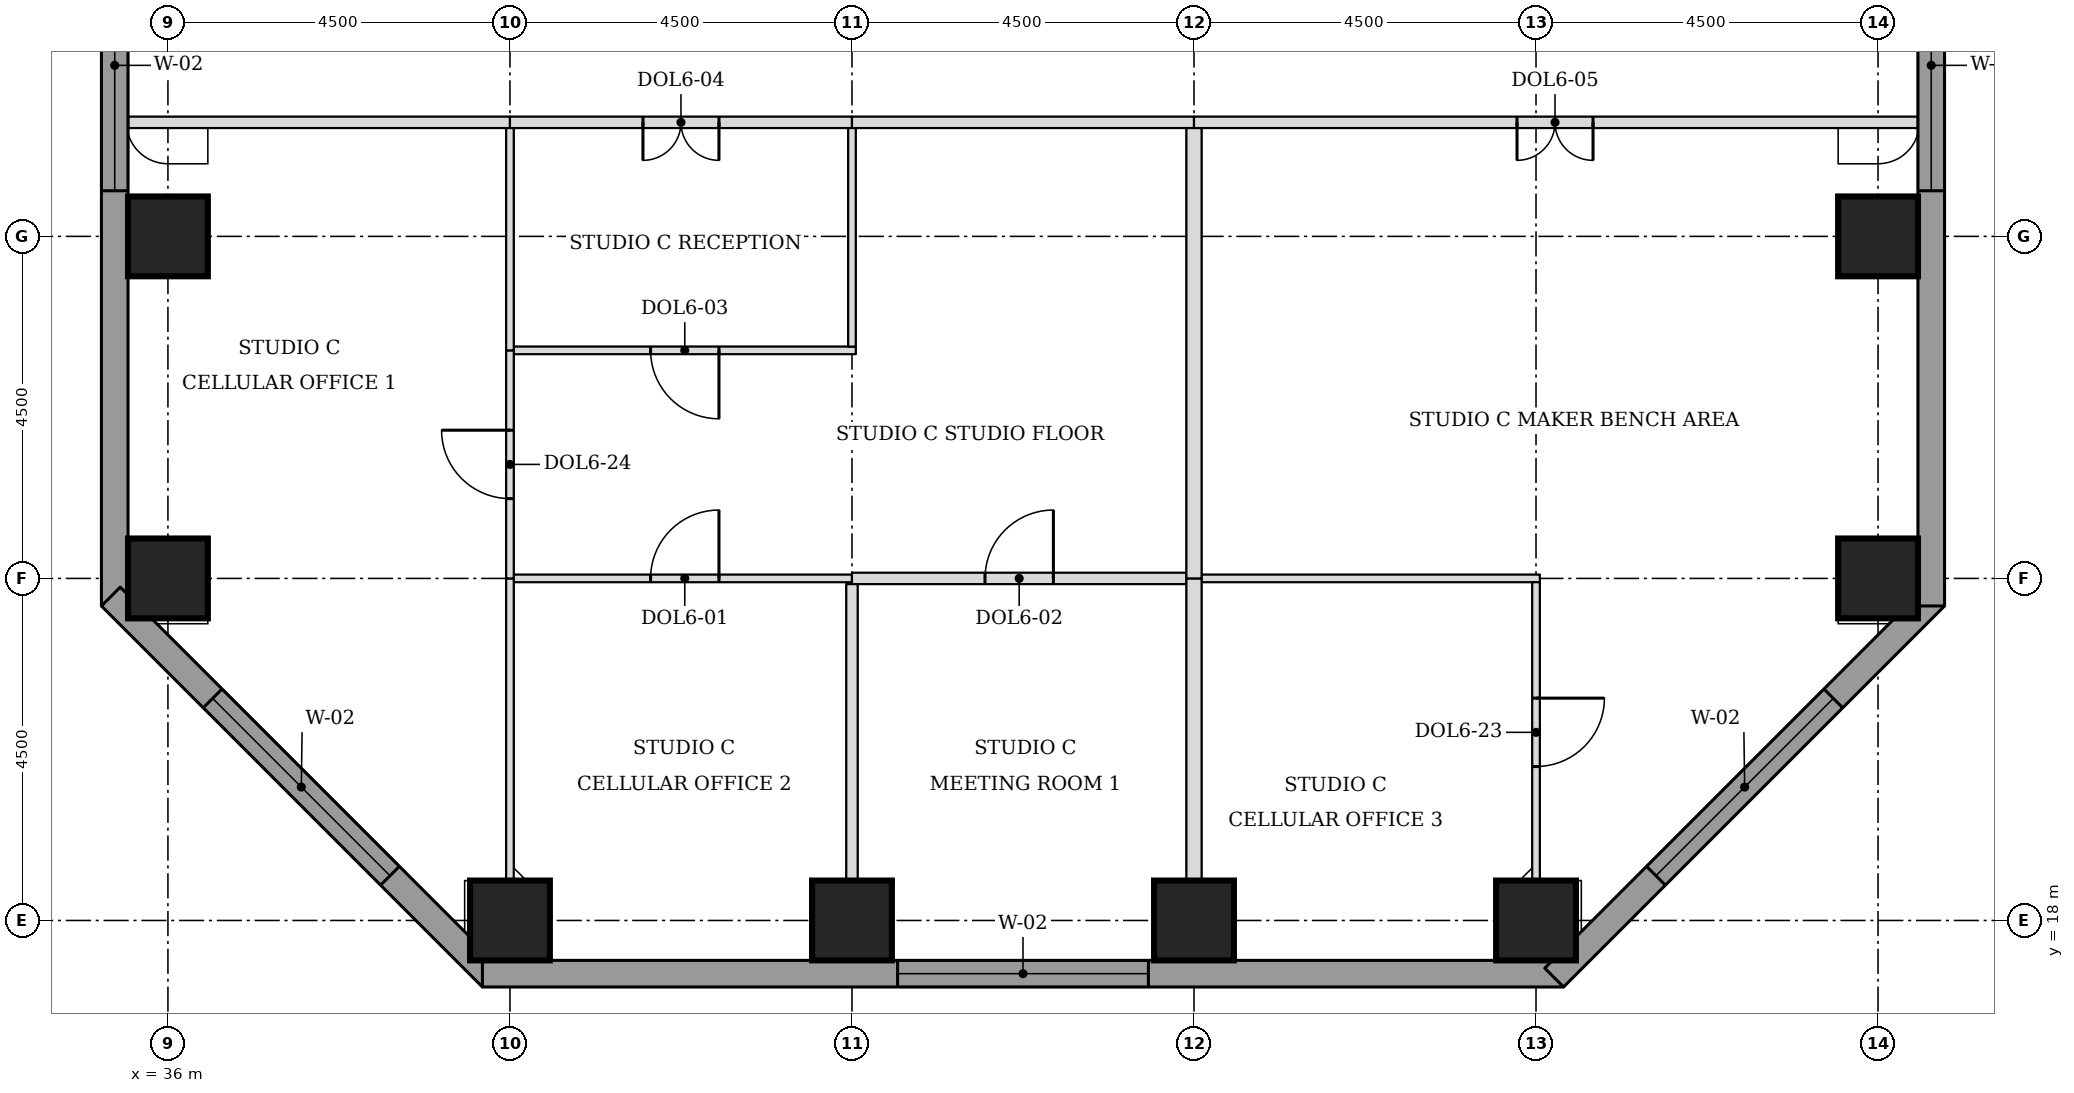
"""IFC4 building model, lengths in metres.
Left out: names, types, materials, properties, quantities, classifications, styles, units other than length and angle.
Written with IfcOpenShell. Run it as: python <this file> out.ifc"""

import sys

from ifc_helpers import new_model, si_unit, direction, frame, frame_2d, origin, origin_2d, place, context, subcontext, project, spatial, rectangle, extrude, element, fill, save


model = new_model("IFC4")
c1 = context("Model", 3, precision=1e-05, world=origin(), true_north=direction((0.0, 1.0)))
c2 = subcontext(c1, "Body", "Model", "MODEL_VIEW")
j1 = project(units=[si_unit("LENGTHUNIT", "METRE"), si_unit("PLANEANGLEUNIT", "RADIAN")], contexts=[c1])
p1 = place(None, origin())
s1 = spatial("IfcSite", under=j1, at=p1, CompositionType="ELEMENT")
p2 = place(p1, origin())
s2 = spatial("IfcBuilding", under=s1, at=p2, CompositionType="ELEMENT")
p3 = place(p2, frame((0.0, 0.0, 115.9)))
s3 = spatial("IfcBuildingStorey", under=s2, at=p3, CompositionType="ELEMENT", Elevation=115.9)
for number, where, z_axis, x_axis in (
    (1, (40.5, 18.0, 0.0), (0.0, 0.0, 1.0), (1.0, 0.0, 0.0)),
    (2, (45.0, 18.0, 0.0), (0.0, 0.0, 1.0), (1.0, 0.0, 0.0)),
    (3, (49.5, 18.0, 0.0), (0.0, 0.0, 1.0), (1.0, 0.0, 0.0)),
    (4, (54.0, 18.0, 0.0), (0.0, 0.0, 1.0), (1.0, 0.0, 0.0)),
    (5, (36.0, 22.5, 0.0), (0.0, 0.0, 1.0), (1.0, 0.0, 0.0)),
    (6, (58.5, 22.5, 0.0), (0.0, 0.0, 1.0), (1.0, 0.0, 0.0)),
    (7, (36.0, 27.0, 0.0), (0.0, 0.0, 1.0), (1.0, 0.0, 0.0)),
    (8, (58.5, 27.0, 0.0), (0.0, 0.0, 1.0), (1.0, 0.0, 0.0)),
):
    element("IfcColumn", number, at=place(p3, frame(where, z_axis=z_axis, x_axis=x_axis)), inside=s3, PredefinedType="COLUMN", context=c2, shape_type="SweptSolid", body=[
        extrude(rectangle(XDim=1.05, YDim=1.05, at=origin_2d()), origin(), (0.0, 0.0, 1.0), 3.7),
    ])
p4 = place(p3, frame((35.3, 39.975, 0.0), z_axis=(0.0, 0.0, 1.0), x_axis=(0.0, -1.0, 0.0)))
e9 = element("IfcWall", 9, at=p4, inside=s3, PredefinedType="STANDARD", context=c2, shape_type="SweptSolid", body=[
    extrude(rectangle(XDim=17.837, YDim=0.35, at=frame_2d((8.919, 0.0))), origin(), (0.0, 0.0, 1.0), 3.525),
])
p5 = place(p4, frame((0.5, 0.0, 0.9)))
e10 = element("IfcOpeningElement", 10, at=p5, cuts=e9, PredefinedType="OPENING", context=c2, shape_type="SweptSolid", body=[
    extrude(rectangle(XDim=3.3, YDim=1.9, at=frame_2d((1.65, 0.95))), frame((0.0, 0.185, 0.0), z_axis=(0.0, -1.0, 0.0), x_axis=(1.0, 0.0, 0.0)), (0.0, 0.0, 1.0), 0.37),
])
p6 = place(p4, frame((9.075, 0.0, 0.9)))
e11 = element("IfcOpeningElement", 11, at=p6, cuts=e9, PredefinedType="OPENING", context=c2, shape_type="SweptSolid", body=[
    extrude(rectangle(XDim=3.3, YDim=1.9, at=frame_2d((1.65, 0.95))), frame((0.0, 0.185, 0.0), z_axis=(0.0, -1.0, 0.0), x_axis=(1.0, 0.0, 0.0)), (0.0, 0.0, 1.0), 0.37),
])
p7 = place(p3, frame((35.249, 22.261, 0.0), z_axis=(0.0, 0.0, 1.0), x_axis=(0.707106781187, -0.707106781187, 0.0)))
e12 = element("IfcWall", 12, at=p7, inside=s3, PredefinedType="STANDARD", context=c2, shape_type="SweptSolid", body=[
    extrude(rectangle(XDim=7.089, YDim=0.35, at=frame_2d((3.544, 0.0))), origin(), (0.0, 0.0, 1.0), 3.525),
])
p8 = place(p7, frame((1.894, 0.0, 0.9)))
e13 = element("IfcOpeningElement", 13, at=p8, cuts=e12, PredefinedType="OPENING", context=c2, shape_type="SweptSolid", body=[
    extrude(rectangle(XDim=3.3, YDim=1.9, at=frame_2d((1.65, 0.95))), frame((0.0, 0.185, 0.0), z_axis=(0.0, -1.0, 0.0), x_axis=(1.0, 0.0, 0.0)), (0.0, 0.0, 1.0), 0.37),
])
p9 = place(p3, frame((40.138, 17.3, 0.0), z_axis=(0.0, 0.0, 1.0), x_axis=(1.0, 0.0, 0.0)))
e14 = element("IfcWall", 14, at=p9, inside=s3, PredefinedType="STANDARD", context=c2, shape_type="SweptSolid", body=[
    extrude(rectangle(XDim=14.225, YDim=0.35, at=frame_2d((7.112, 0.0))), origin(), (0.0, 0.0, 1.0), 3.525),
])
p10 = place(p9, frame((5.462, 0.0, 0.9)))
e15 = element("IfcOpeningElement", 15, at=p10, cuts=e14, PredefinedType="OPENING", context=c2, shape_type="SweptSolid", body=[
    extrude(rectangle(XDim=3.3, YDim=1.9, at=frame_2d((1.65, 0.95))), frame((0.0, 0.185, 0.0), z_axis=(0.0, -1.0, 0.0), x_axis=(1.0, 0.0, 0.0)), (0.0, 0.0, 1.0), 0.37),
])
p11 = place(p3, frame((54.239, 17.249, 0.0), z_axis=(0.0, 0.0, 1.0), x_axis=(0.707106781187, 0.707106781187, 0.0)))
e16 = element("IfcWall", 16, at=p11, inside=s3, PredefinedType="STANDARD", context=c2, shape_type="SweptSolid", body=[
    extrude(rectangle(XDim=7.089, YDim=0.35, at=frame_2d((3.544, 0.0))), origin(), (0.0, 0.0, 1.0), 3.525),
])
p12 = place(p11, frame((1.894, 0.0, 0.9)))
e17 = element("IfcOpeningElement", 17, at=p12, cuts=e16, PredefinedType="OPENING", context=c2, shape_type="SweptSolid", body=[
    extrude(rectangle(XDim=3.3, YDim=1.9, at=frame_2d((1.65, 0.95))), frame((0.0, 0.185, 0.0), z_axis=(0.0, -1.0, 0.0), x_axis=(1.0, 0.0, 0.0)), (0.0, 0.0, 1.0), 0.37),
])
p13 = place(p3, frame((59.2, 22.138, 0.0), z_axis=(0.0, 0.0, 1.0), x_axis=(0.0, 1.0, 0.0)))
e18 = element("IfcWall", 18, at=p13, inside=s3, PredefinedType="STANDARD", context=c2, shape_type="SweptSolid", body=[
    extrude(rectangle(XDim=17.837, YDim=0.35, at=frame_2d((8.919, 0.0))), origin(), (0.0, 0.0, 1.0), 3.525),
])
p14 = place(p13, frame((5.462, 0.0, 0.9)))
e19 = element("IfcOpeningElement", 19, at=p14, cuts=e18, PredefinedType="OPENING", context=c2, shape_type="SweptSolid", body=[
    extrude(rectangle(XDim=3.3, YDim=1.9, at=frame_2d((1.65, 0.95))), frame((0.0, 0.185, 0.0), z_axis=(0.0, -1.0, 0.0), x_axis=(1.0, 0.0, 0.0)), (0.0, 0.0, 1.0), 0.37),
])
p15 = place(p13, frame((14.037, 0.0, 0.9)))
e20 = element("IfcOpeningElement", 20, at=p15, cuts=e18, PredefinedType="OPENING", context=c2, shape_type="SweptSolid", body=[
    extrude(rectangle(XDim=3.3, YDim=1.9, at=frame_2d((1.65, 0.95))), frame((0.0, 0.185, 0.0), z_axis=(0.0, -1.0, 0.0), x_axis=(1.0, 0.0, 0.0)), (0.0, 0.0, 1.0), 0.37),
])
p16 = place(p3, frame((40.55, 22.5, 0.0), z_axis=(0.0, 0.0, 1.0), x_axis=(1.0, 0.0, 0.0)))
e21 = element("IfcWall", 21, at=p16, inside=s3, PredefinedType="PARTITIONING", context=c2, shape_type="SweptSolid", body=[
    extrude(rectangle(XDim=4.45, YDim=0.1, at=frame_2d((2.225, 0.0))), origin(), (0.0, 0.0, 1.0), 2.55),
])
p17 = place(p16, frame((1.8, 0.0, 0.0)))
e22 = element("IfcOpeningElement", 22, at=p17, cuts=e21, PredefinedType="OPENING", context=c2, shape_type="SweptSolid", body=[
    extrude(rectangle(XDim=0.9, YDim=2.1, at=frame_2d((0.45, 1.05))), frame((0.0, 0.06, 0.0), z_axis=(0.0, -1.0, 0.0), x_axis=(1.0, 0.0, 0.0)), (0.0, 0.0, 1.0), 0.12),
])
p18 = place(p3, frame((45.0, 22.5, 0.0), z_axis=(0.0, 0.0, 1.0), x_axis=(1.0, 0.0, 0.0)))
e23 = element("IfcWall", 23, at=p18, inside=s3, PredefinedType="PARTITIONING", context=c2, shape_type="SweptSolid", body=[
    extrude(rectangle(XDim=4.4, YDim=0.15, at=frame_2d((2.2, 0.0))), origin(), (0.0, 0.0, 1.0), 2.55),
])
p19 = place(p18, frame((1.75, 0.0, 0.0)))
e24 = element("IfcOpeningElement", 24, at=p19, cuts=e23, PredefinedType="OPENING", context=c2, shape_type="SweptSolid", body=[
    extrude(rectangle(XDim=0.9, YDim=2.1, at=frame_2d((0.45, 1.05))), frame((0.0, 0.085, 0.0), z_axis=(0.0, -1.0, 0.0), x_axis=(1.0, 0.0, 0.0)), (0.0, 0.0, 1.0), 0.17),
])
p20 = place(p3, frame((49.6, 22.5, 0.0), z_axis=(0.0, 0.0, 1.0), x_axis=(1.0, 0.0, 0.0)))
e25 = element("IfcWall", 25, at=p20, inside=s3, PredefinedType="PARTITIONING", context=c2, shape_type="SweptSolid", body=[
    extrude(rectangle(XDim=4.45, YDim=0.1, at=frame_2d((2.225, 0.0))), origin(), (0.0, 0.0, 1.0), 2.55),
])
p21 = place(p3, frame((40.55, 25.5, 0.0), z_axis=(0.0, 0.0, 1.0), x_axis=(1.0, 0.0, 0.0)))
e26 = element("IfcWall", 26, at=p21, inside=s3, PredefinedType="PARTITIONING", context=c2, shape_type="SweptSolid", body=[
    extrude(rectangle(XDim=4.5, YDim=0.1, at=frame_2d((2.25, 0.0))), origin(), (0.0, 0.0, 1.0), 3.55),
])
p22 = place(p21, frame((1.8, 0.0, 0.0)))
e27 = element("IfcOpeningElement", 27, at=p22, cuts=e26, PredefinedType="OPENING", context=c2, shape_type="SweptSolid", body=[
    extrude(rectangle(XDim=0.9, YDim=2.1, at=frame_2d((0.45, 1.05))), frame((0.0, 0.06, 0.0), z_axis=(0.0, -1.0, 0.0), x_axis=(1.0, 0.0, 0.0)), (0.0, 0.0, 1.0), 0.12),
])
p23 = place(p3, frame((35.475, 28.5, 0.0), z_axis=(0.0, 0.0, 1.0), x_axis=(1.0, 0.0, 0.0)))
e28 = element("IfcWall", 28, at=p23, inside=s3, PredefinedType="PARTITIONING", context=c2, shape_type="SweptSolid", body=[
    extrude(rectangle(XDim=5.025, YDim=0.15, at=frame_2d((2.512, 0.0))), origin(), (0.0, 0.0, 1.0), 3.55),
])
p24 = place(p3, frame((40.5, 28.5, 0.0), z_axis=(0.0, 0.0, 1.0), x_axis=(1.0, 0.0, 0.0)))
e29 = element("IfcWall", 29, at=p24, inside=s3, PredefinedType="PARTITIONING", context=c2, shape_type="SweptSolid", body=[
    extrude(rectangle(XDim=4.5, YDim=0.15, at=frame_2d((2.25, 0.0))), origin(), (0.0, 0.0, 1.0), 3.55),
])
p25 = place(p24, frame((1.75, 0.0, 0.0)))
e30 = element("IfcOpeningElement", 30, at=p25, cuts=e29, PredefinedType="OPENING", context=c2, shape_type="SweptSolid", body=[
    extrude(rectangle(XDim=1.0, YDim=2.1, at=frame_2d((0.5, 1.05))), frame((0.0, 0.085, 0.0), z_axis=(0.0, -1.0, 0.0), x_axis=(1.0, 0.0, 0.0)), (0.0, 0.0, 1.0), 0.17),
])
p26 = place(p3, frame((45.0, 28.5, 0.0), z_axis=(0.0, 0.0, 1.0), x_axis=(1.0, 0.0, 0.0)))
e31 = element("IfcWall", 31, at=p26, inside=s3, PredefinedType="PARTITIONING", context=c2, shape_type="SweptSolid", body=[
    extrude(rectangle(XDim=4.5, YDim=0.15, at=frame_2d((2.25, 0.0))), origin(), (0.0, 0.0, 1.0), 3.55),
])
p27 = place(p3, frame((49.5, 28.5, 0.0), z_axis=(0.0, 0.0, 1.0), x_axis=(1.0, 0.0, 0.0)))
e32 = element("IfcWall", 32, at=p27, inside=s3, PredefinedType="PARTITIONING", context=c2, shape_type="SweptSolid", body=[
    extrude(rectangle(XDim=9.525, YDim=0.15, at=frame_2d((4.762, 0.0))), origin(), (0.0, 0.0, 1.0), 3.55),
])
p28 = place(p27, frame((4.25, 0.0, 0.0)))
e33 = element("IfcOpeningElement", 33, at=p28, cuts=e32, PredefinedType="OPENING", context=c2, shape_type="SweptSolid", body=[
    extrude(rectangle(XDim=1.0, YDim=2.1, at=frame_2d((0.5, 1.05))), frame((0.0, 0.085, 0.0), z_axis=(0.0, -1.0, 0.0), x_axis=(1.0, 0.0, 0.0)), (0.0, 0.0, 1.0), 0.17),
])
p29 = place(p3, frame((45.0, 17.475, 0.0), z_axis=(0.0, 0.0, 1.0), x_axis=(0.0, 1.0, 0.0)))
e34 = element("IfcWall", 34, at=p29, inside=s3, PredefinedType="PARTITIONING", context=c2, shape_type="SweptSolid", body=[
    extrude(rectangle(XDim=4.95, YDim=0.15, at=frame_2d((2.475, 0.0))), origin(), (0.0, 0.0, 1.0), 3.55),
])
p30 = place(p3, frame((49.5, 17.475, 0.0), z_axis=(0.0, 0.0, 1.0), x_axis=(0.0, 1.0, 0.0)))
e35 = element("IfcWall", 35, at=p30, inside=s3, PredefinedType="PARTITIONING", context=c2, shape_type="SweptSolid", body=[
    extrude(rectangle(XDim=5.025, YDim=0.2, at=frame_2d((2.512, 0.0))), origin(), (0.0, 0.0, 1.0), 3.55),
])
p31 = place(p3, frame((40.5, 18.525, 0.0), z_axis=(0.0, 0.0, 1.0), x_axis=(0.0, 1.0, 0.0)))
e36 = element("IfcWall", 36, at=p31, inside=s3, PredefinedType="PARTITIONING", context=c2, shape_type="SweptSolid", body=[
    extrude(rectangle(XDim=3.975, YDim=0.1, at=frame_2d((1.988, 0.0))), origin(), (0.0, 0.0, 1.0), 3.55),
])
p32 = place(p3, frame((54.0, 18.525, 0.0), z_axis=(0.0, 0.0, 1.0), x_axis=(0.0, 1.0, 0.0)))
e37 = element("IfcWall", 37, at=p32, inside=s3, PredefinedType="PARTITIONING", context=c2, shape_type="SweptSolid", body=[
    extrude(rectangle(XDim=3.925, YDim=0.1, at=frame_2d((1.962, 0.0))), origin(), (0.0, 0.0, 1.0), 3.55),
])
p33 = place(p32, frame((1.5, 0.0, 0.0)))
e38 = element("IfcOpeningElement", 38, at=p33, cuts=e37, PredefinedType="OPENING", context=c2, shape_type="SweptSolid", body=[
    extrude(rectangle(XDim=0.9, YDim=2.1, at=frame_2d((0.45, 1.05))), frame((0.0, 0.06, 0.0), z_axis=(0.0, -1.0, 0.0), x_axis=(1.0, 0.0, 0.0)), (0.0, 0.0, 1.0), 0.12),
])
p34 = place(p3, frame((40.5, 22.5, 0.0), z_axis=(0.0, 0.0, 1.0), x_axis=(0.0, 1.0, 0.0)))
e39 = element("IfcWall", 39, at=p34, inside=s3, PredefinedType="PARTITIONING", context=c2, shape_type="SweptSolid", body=[
    extrude(rectangle(XDim=3.0, YDim=0.1, at=frame_2d((1.5, 0.0))), origin(), (0.0, 0.0, 1.0), 3.55),
])
p35 = place(p34, frame((1.05, 0.0, 0.0)))
e40 = element("IfcOpeningElement", 40, at=p35, cuts=e39, PredefinedType="OPENING", context=c2, shape_type="SweptSolid", body=[
    extrude(rectangle(XDim=0.9, YDim=2.1, at=frame_2d((0.45, 1.05))), frame((0.0, 0.06, 0.0), z_axis=(0.0, -1.0, 0.0), x_axis=(1.0, 0.0, 0.0)), (0.0, 0.0, 1.0), 0.12),
])
p36 = place(p3, frame((49.5, 22.5, 0.0), z_axis=(0.0, 0.0, 1.0), x_axis=(0.0, 1.0, 0.0)))
e41 = element("IfcWall", 41, at=p36, inside=s3, PredefinedType="PARTITIONING", context=c2, shape_type="SweptSolid", body=[
    extrude(rectangle(XDim=5.925, YDim=0.2, at=frame_2d((2.962, 0.0))), origin(), (0.0, 0.0, 1.0), 3.55),
])
p37 = place(p3, frame((40.5, 25.5, 0.0), z_axis=(0.0, 0.0, 1.0), x_axis=(0.0, 1.0, 0.0)))
e42 = element("IfcWall", 42, at=p37, inside=s3, PredefinedType="PARTITIONING", context=c2, shape_type="SweptSolid", body=[
    extrude(rectangle(XDim=2.925, YDim=0.1, at=frame_2d((1.462, 0.0))), origin(), (0.0, 0.0, 1.0), 3.55),
])
p38 = place(p3, frame((45.0, 25.55, 0.0), z_axis=(0.0, 0.0, 1.0), x_axis=(0.0, 1.0, 0.0)))
e43 = element("IfcWall", 43, at=p38, inside=s3, PredefinedType="PARTITIONING", context=c2, shape_type="SweptSolid", body=[
    extrude(rectangle(XDim=2.875, YDim=0.1, at=frame_2d((1.438, 0.0))), origin(), (0.0, 0.0, 1.0), 3.55),
])
p39 = place(p6, origin())
e44 = element("IfcWindow", 44, at=p39, inside=s3, PartitioningType="SINGLE_PANEL", PredefinedType="WINDOW", context=c2, shape_type="SweptSolid", body=[
    extrude(rectangle(XDim=3.3, YDim=1.9, at=frame_2d((1.65, 0.95))), frame((0.0, 0.085, 0.0), z_axis=(0.0, -1.0, 0.0), x_axis=(1.0, 0.0, 0.0)), (0.0, 0.0, 1.0), 0.06),
])
fill(e11, e44)
p40 = place(p8, origin())
e45 = element("IfcWindow", 45, at=p40, inside=s3, PartitioningType="SINGLE_PANEL", PredefinedType="WINDOW", context=c2, shape_type="SweptSolid", body=[
    extrude(rectangle(XDim=3.3, YDim=1.9, at=frame_2d((1.65, 0.95))), frame((0.0, 0.085, 0.0), z_axis=(0.0, -1.0, 0.0), x_axis=(1.0, 0.0, 0.0)), (0.0, 0.0, 1.0), 0.06),
])
fill(e13, e45)
p41 = place(p10, origin())
e46 = element("IfcWindow", 46, at=p41, inside=s3, PartitioningType="SINGLE_PANEL", PredefinedType="WINDOW", context=c2, shape_type="SweptSolid", body=[
    extrude(rectangle(XDim=3.3, YDim=1.9, at=frame_2d((1.65, 0.95))), frame((0.0, 0.085, 0.0), z_axis=(0.0, -1.0, 0.0), x_axis=(1.0, 0.0, 0.0)), (0.0, 0.0, 1.0), 0.06),
])
fill(e15, e46)
p42 = place(p12, origin())
e47 = element("IfcWindow", 47, at=p42, inside=s3, PartitioningType="SINGLE_PANEL", PredefinedType="WINDOW", context=c2, shape_type="SweptSolid", body=[
    extrude(rectangle(XDim=3.3, YDim=1.9, at=frame_2d((1.65, 0.95))), frame((0.0, 0.085, 0.0), z_axis=(0.0, -1.0, 0.0), x_axis=(1.0, 0.0, 0.0)), (0.0, 0.0, 1.0), 0.06),
])
fill(e17, e47)
p43 = place(p14, origin())
e48 = element("IfcWindow", 48, at=p43, inside=s3, PartitioningType="SINGLE_PANEL", PredefinedType="WINDOW", context=c2, shape_type="SweptSolid", body=[
    extrude(rectangle(XDim=3.3, YDim=1.9, at=frame_2d((1.65, 0.95))), frame((0.0, 0.085, 0.0), z_axis=(0.0, -1.0, 0.0), x_axis=(1.0, 0.0, 0.0)), (0.0, 0.0, 1.0), 0.06),
])
fill(e19, e48)
p44 = place(p25, frame((1.0, 0.0, 0.0), z_axis=(0.0, 0.0, 1.0), x_axis=(-1.0, 0.0, 0.0)))
e49 = element("IfcDoor", 49, at=p44, inside=s3, OperationType="DOUBLE_DOOR_SINGLE_SWING", PredefinedType="DOOR", context=c2, shape_type="SweptSolid", body=[
    extrude(rectangle(XDim=1.0, YDim=2.1, at=frame_2d((0.5, 1.05))), frame((0.0, 0.025, 0.0), z_axis=(0.0, -1.0, 0.0), x_axis=(1.0, 0.0, 0.0)), (0.0, 0.0, 1.0), 0.05),
])
fill(e30, e49)
p45 = place(p22, frame((0.9, 0.0, 0.0), z_axis=(0.0, 0.0, 1.0), x_axis=(-1.0, 0.0, 0.0)))
e50 = element("IfcDoor", 50, at=p45, inside=s3, OperationType="SINGLE_SWING_LEFT", PredefinedType="DOOR", context=c2, shape_type="SweptSolid", body=[
    extrude(rectangle(XDim=0.9, YDim=2.1, at=frame_2d((0.45, 1.05))), frame((0.0, 0.025, 0.0), z_axis=(0.0, -1.0, 0.0), x_axis=(1.0, 0.0, 0.0)), (0.0, 0.0, 1.0), 0.05),
])
fill(e27, e50)
p46 = place(p35, origin())
e51 = element("IfcDoor", 51, at=p46, inside=s3, OperationType="SINGLE_SWING_RIGHT", PredefinedType="DOOR", context=c2, shape_type="SweptSolid", body=[
    extrude(rectangle(XDim=0.9, YDim=2.1, at=frame_2d((0.45, 1.05))), frame((0.0, 0.025, 0.0), z_axis=(0.0, -1.0, 0.0), x_axis=(1.0, 0.0, 0.0)), (0.0, 0.0, 1.0), 0.05),
])
fill(e40, e51)
p47 = place(p17, origin())
e52 = element("IfcDoor", 52, at=p47, inside=s3, OperationType="SINGLE_SWING_RIGHT", PredefinedType="DOOR", context=c2, shape_type="SweptSolid", body=[
    extrude(rectangle(XDim=0.9, YDim=2.1, at=frame_2d((0.45, 1.05))), frame((0.0, 0.025, 0.0), z_axis=(0.0, -1.0, 0.0), x_axis=(1.0, 0.0, 0.0)), (0.0, 0.0, 1.0), 0.05),
])
fill(e22, e52)
p48 = place(p19, origin())
e53 = element("IfcDoor", 53, at=p48, inside=s3, OperationType="SINGLE_SWING_RIGHT", PredefinedType="DOOR", context=c2, shape_type="SweptSolid", body=[
    extrude(rectangle(XDim=0.9, YDim=2.1, at=frame_2d((0.45, 1.05))), frame((0.0, 0.025, 0.0), z_axis=(0.0, -1.0, 0.0), x_axis=(1.0, 0.0, 0.0)), (0.0, 0.0, 1.0), 0.05),
])
fill(e24, e53)
p49 = place(p28, frame((1.0, 0.0, 0.0), z_axis=(0.0, 0.0, 1.0), x_axis=(-1.0, 0.0, 0.0)))
e54 = element("IfcDoor", 54, at=p49, inside=s3, OperationType="DOUBLE_DOOR_SINGLE_SWING", PredefinedType="DOOR", context=c2, shape_type="SweptSolid", body=[
    extrude(rectangle(XDim=1.0, YDim=2.1, at=frame_2d((0.5, 1.05))), frame((0.0, 0.025, 0.0), z_axis=(0.0, -1.0, 0.0), x_axis=(1.0, 0.0, 0.0)), (0.0, 0.0, 1.0), 0.05),
])
fill(e33, e54)
p50 = place(p33, frame((0.9, 0.0, 0.0), z_axis=(0.0, 0.0, 1.0), x_axis=(-1.0, 0.0, 0.0)))
e55 = element("IfcDoor", 55, at=p50, inside=s3, OperationType="SINGLE_SWING_LEFT", PredefinedType="DOOR", context=c2, shape_type="SweptSolid", body=[
    extrude(rectangle(XDim=0.9, YDim=2.1, at=frame_2d((0.45, 1.05))), frame((0.0, 0.025, 0.0), z_axis=(0.0, -1.0, 0.0), x_axis=(1.0, 0.0, 0.0)), (0.0, 0.0, 1.0), 0.05),
])
fill(e38, e55)
save(model, sys.argv[1])
